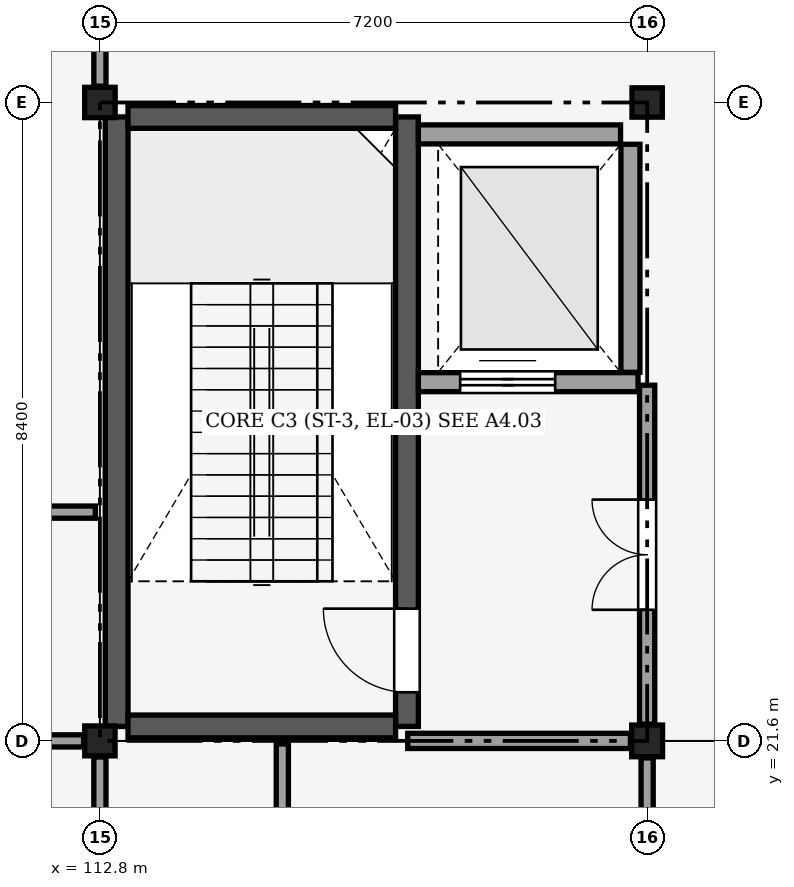
"""IFC4 building model, lengths in metres.
Left out: names, types, materials, properties, quantities, classifications, styles, units other than length and angle.
Written with IfcOpenShell. Run it as: python <this file> out.ifc"""

import sys

from ifc_helpers import new_model, si_unit, direction, frame, frame_2d, origin, origin_2d, place, context, subcontext, project, spatial, rectangle, i_section, extrude, element, fill, save


model = new_model("IFC4")
c1 = context("Model", 3, precision=1e-05, world=origin(), true_north=direction((0.0, 1.0)))
c2 = subcontext(c1, "Body", "Model", "MODEL_VIEW")
j1 = project(units=[si_unit("LENGTHUNIT", "METRE"), si_unit("PLANEANGLEUNIT", "RADIAN")], contexts=[c1])
p1 = place(None, origin())
s1 = spatial("IfcSite", under=j1, at=p1, CompositionType="ELEMENT")
p2 = place(p1, origin())
s2 = spatial("IfcBuilding", under=s1, at=p2, CompositionType="ELEMENT")
p3 = place(p2, origin())
s3 = spatial("IfcBuildingStorey", under=s2, at=p3, CompositionType="ELEMENT", Elevation=0.0)
p4 = place(p3, frame((112.8, 21.6, 0.0), z_axis=(0.0, 0.0, 1.0), x_axis=(1.0, 0.0, 0.0)))
e1 = element("IfcColumn", 1, at=p4, inside=s3, PredefinedType="COLUMN", context=c2, shape_type="SweptSolid", body=[
    extrude(i_section(OverallWidth=0.399, OverallDepth=0.394, WebThickness=0.023, FlangeThickness=0.037, FilletRadius=0.025, at=origin_2d()), origin(), (0.0, 0.0, 1.0), 5.4),
])
p5 = place(p3, frame((112.8, 30.0, 0.0), z_axis=(0.0, 0.0, 1.0), x_axis=(1.0, 0.0, 0.0)))
e2 = element("IfcColumn", 2, at=p5, inside=s3, PredefinedType="COLUMN", context=c2, shape_type="SweptSolid", body=[
    extrude(i_section(OverallWidth=0.401, OverallDepth=0.399, WebThickness=0.025, FlangeThickness=0.04, FilletRadius=0.025, at=origin_2d()), origin(), (0.0, 0.0, 1.0), 5.4),
])
p6 = place(p3, frame((120.0, 21.6, 0.0), z_axis=(0.0, 0.0, 1.0), x_axis=(1.0, 0.0, 0.0)))
e3 = element("IfcColumn", 3, at=p6, inside=s3, PredefinedType="COLUMN", context=c2, shape_type="SweptSolid", body=[
    extrude(i_section(OverallWidth=0.406, OverallDepth=0.417, WebThickness=0.03, FlangeThickness=0.048, FilletRadius=0.025, at=origin_2d()), origin(), (0.0, 0.0, 1.0), 5.4),
])
p7 = place(p3, frame((120.0, 30.0, 0.0), z_axis=(0.0, 0.0, 1.0), x_axis=(1.0, 0.0, 0.0)))
e4 = element("IfcColumn", 4, at=p7, inside=s3, PredefinedType="COLUMN", context=c2, shape_type="SweptSolid", body=[
    extrude(i_section(OverallWidth=0.399, OverallDepth=0.386, WebThickness=0.021, FlangeThickness=0.033, FilletRadius=0.025, at=origin_2d()), origin(), (0.0, 0.0, 1.0), 5.4),
])
p8 = place(p3, frame((113.02, 21.79, 0.0), z_axis=(0.0, 0.0, 1.0), x_axis=(0.0, 1.0, 0.0)))
e5 = element("IfcWall", 5, at=p8, inside=s3, PredefinedType="SHEAR", context=c2, shape_type="SweptSolid", body=[
    extrude(rectangle(XDim=8.02, YDim=0.3, at=frame_2d((4.01, 0.0))), origin(), (0.0, 0.0, 1.0), 5.16),
])
p9 = place(p3, frame((116.84, 21.79, 0.0), z_axis=(0.0, 0.0, 1.0), x_axis=(0.0, 1.0, 0.0)))
e6 = element("IfcWall", 6, at=p9, inside=s3, PredefinedType="SHEAR", context=c2, shape_type="SweptSolid", body=[
    extrude(rectangle(XDim=8.02, YDim=0.3, at=frame_2d((4.01, 0.0))), origin(), (0.0, 0.0, 1.0), 5.16),
])
p10 = place(p9, frame((0.45, 0.0, 0.0)))
e7 = element("IfcOpeningElement", 7, at=p10, cuts=e6, PredefinedType="OPENING", context=c2, shape_type="SweptSolid", body=[
    extrude(rectangle(XDim=1.1, YDim=2.15, at=frame_2d((0.55, 1.075))), frame((0.0, 0.16, 0.0), z_axis=(0.0, -1.0, 0.0), x_axis=(1.0, 0.0, 0.0)), (0.0, 0.0, 1.0), 0.321),
])
for number, where, z_axis, x_axis in (
    (8, (113.17, 21.79, 0.0), (0.0, 0.0, 1.0), (1.0, 0.0, 0.0)),
    (9, (113.17, 29.81, 0.0), (0.0, 0.0, 1.0), (1.0, 0.0, 0.0)),
):
    element("IfcWall", number, at=place(p3, frame(where, z_axis=z_axis, x_axis=x_axis)), inside=s3, PredefinedType="SHEAR", context=c2, shape_type="SweptSolid", body=[
        extrude(rectangle(XDim=3.52, YDim=0.3, at=frame_2d((1.76, 0.0))), origin(), (0.0, 0.0, 1.0), 5.16),
    ])
p11 = place(p3, frame((116.99, 29.58, 0.0), z_axis=(0.0, 0.0, 1.0), x_axis=(1.0, 0.0, 0.0)))
e10 = element("IfcWall", 10, at=p11, inside=s3, PredefinedType="PARTITIONING", context=c2, shape_type="SweptSolid", body=[
    extrude(rectangle(XDim=2.66, YDim=0.25, at=frame_2d((1.33, 0.0))), origin(), (0.0, 0.0, 1.0), 5.16),
])
p12 = place(p3, frame((119.78, 26.45, 0.0), z_axis=(0.0, 0.0, 1.0), x_axis=(0.0, 1.0, 0.0)))
e11 = element("IfcWall", 11, at=p12, inside=s3, PredefinedType="PARTITIONING", context=c2, shape_type="SweptSolid", body=[
    extrude(rectangle(XDim=3.0, YDim=0.25, at=frame_2d((1.5, 0.0))), origin(), (0.0, 0.0, 1.0), 4.368),
])
p13 = place(p3, frame((116.99, 26.32, 0.0), z_axis=(0.0, 0.0, 1.0), x_axis=(1.0, 0.0, 0.0)))
e12 = element("IfcWall", 12, at=p13, inside=s3, PredefinedType="PARTITIONING", context=c2, shape_type="SweptSolid", body=[
    extrude(rectangle(XDim=2.89, YDim=0.25, at=frame_2d((1.445, 0.0))), origin(), (0.0, 0.0, 1.0), 5.16),
])
p14 = place(p13, frame((0.55, 0.0, 0.0)))
e13 = element("IfcOpeningElement", 13, at=p14, cuts=e12, PredefinedType="OPENING", context=c2, shape_type="SweptSolid", body=[
    extrude(rectangle(XDim=1.25, YDim=2.15, at=frame_2d((0.625, 1.075))), frame((0.0, 0.135, 0.0), z_axis=(0.0, -1.0, 0.0), x_axis=(1.0, 0.0, 0.0)), (0.0, 0.0, 1.0), 0.271),
])
p15 = place(p3, frame((116.85, 21.6, 0.0), z_axis=(0.0, 0.0, 1.0), x_axis=(1.0, 0.0, 0.0)))
e14 = element("IfcWall", 14, at=p15, inside=s3, PredefinedType="PARTITIONING", context=c2, shape_type="SweptSolid", body=[
    extrude(rectangle(XDim=2.93, YDim=0.2, at=frame_2d((1.465, 0.0))), origin(), (0.0, 0.0, 1.0), 4.678),
])
p16 = place(p3, frame((120.0, 21.82, 0.0), z_axis=(0.0, 0.0, 1.0), x_axis=(0.0, 1.0, 0.0)))
e15 = element("IfcWall", 15, at=p16, inside=s3, PredefinedType="PARTITIONING", context=c2, shape_type="SweptSolid", body=[
    extrude(rectangle(XDim=4.46, YDim=0.2, at=frame_2d((2.23, 0.0))), origin(), (0.0, 0.0, 1.0), 4.368),
])
p17 = place(p16, frame((1.505, 0.0, 0.0)))
e16 = element("IfcOpeningElement", 16, at=p17, cuts=e15, PredefinedType="OPENING", context=c2, shape_type="SweptSolid", body=[
    extrude(rectangle(XDim=1.45, YDim=2.2, at=frame_2d((0.725, 1.1))), frame((0.0, 0.11, 0.0), z_axis=(0.0, -1.0, 0.0), x_axis=(1.0, 0.0, 0.0)), (0.0, 0.0, 1.0), 0.22),
])
p18 = place(p3, frame((104.517, 21.6, 0.0), z_axis=(0.0, 0.0, 1.0), x_axis=(1.0, 0.0, 0.0)))
e17 = element("IfcWall", 17, at=p18, inside=s3, PredefinedType="PARTITIONING", context=c2, shape_type="SweptSolid", body=[
    extrude(rectangle(XDim=8.069, YDim=0.16, at=frame_2d((4.034, 0.0))), origin(), (0.0, 0.0, 1.0), 4.528),
])
p19 = place(p18, frame((3.234, 0.0, 0.0)))
e18 = element("IfcOpeningElement", 18, at=p19, cuts=e17, PredefinedType="OPENING", context=c2, shape_type="SweptSolid", body=[
    extrude(rectangle(XDim=1.6, YDim=2.35, at=frame_2d((0.8, 1.175))), frame((0.0, 0.09, 0.0), z_axis=(0.0, -1.0, 0.0), x_axis=(1.0, 0.0, 0.0)), (0.0, 0.0, 1.0), 0.18),
])
p20 = place(p3, frame((112.8, 14.603, 0.0), z_axis=(0.0, 0.0, 1.0), x_axis=(0.0, 1.0, 0.0)))
e19 = element("IfcWall", 19, at=p20, inside=s3, PredefinedType="PARTITIONING", context=c2, shape_type="SweptSolid", body=[
    extrude(rectangle(XDim=6.785, YDim=0.16, at=frame_2d((3.393, 0.0))), origin(), (0.0, 0.0, 1.0), 4.607),
])
p21 = place(p3, frame((104.41, 24.61, 0.0), z_axis=(0.0, 0.0, 1.0), x_axis=(1.0, 0.0, 0.0)))
e20 = element("IfcWall", 20, at=p21, inside=s3, PredefinedType="PARTITIONING", context=c2, shape_type="SweptSolid", body=[
    extrude(rectangle(XDim=8.33, YDim=0.16, at=frame_2d((4.165, 0.0))), origin(), (0.0, 0.0, 1.0), 5.14),
])
p22 = place(p21, frame((3.565, 0.0, 0.0)))
e21 = element("IfcOpeningElement", 21, at=p22, cuts=e20, PredefinedType="OPENING", context=c2, shape_type="SweptSolid", body=[
    extrude(rectangle(XDim=1.2, YDim=2.2, at=frame_2d((0.6, 1.1))), frame((0.0, 0.09, 0.0), z_axis=(0.0, -1.0, 0.0), x_axis=(1.0, 0.0, 0.0)), (0.0, 0.0, 1.0), 0.18),
])
p23 = place(p3, frame((112.8, 30.215, 0.0), z_axis=(0.0, 0.0, 1.0), x_axis=(0.0, 1.0, 0.0)))
e22 = element("IfcWall", 22, at=p23, inside=s3, PredefinedType="PARTITIONING", context=c2, shape_type="SweptSolid", body=[
    extrude(rectangle(XDim=7.967, YDim=0.16, at=frame_2d((3.984, 0.0))), origin(), (0.0, 0.0, 1.0), 4.368),
])
p24 = place(p3, frame((115.2, 14.42, 0.0), z_axis=(0.0, 0.0, 1.0), x_axis=(0.0, 1.0, 0.0)))
e23 = element("IfcWall", 23, at=p24, inside=s3, PredefinedType="PARTITIONING", context=c2, shape_type="SweptSolid", body=[
    extrude(rectangle(XDim=7.14, YDim=0.16, at=frame_2d((3.57, 0.0))), origin(), (0.0, 0.0, 1.0), 5.14),
])
p25 = place(p3, frame((120.0, 14.602, 0.0), z_axis=(0.0, 0.0, 1.0), x_axis=(0.0, 1.0, 0.0)))
e24 = element("IfcWall", 24, at=p25, inside=s3, PredefinedType="PARTITIONING", context=c2, shape_type="SweptSolid", body=[
    extrude(rectangle(XDim=6.775, YDim=0.16, at=frame_2d((3.387, 0.0))), origin(), (0.0, 0.0, 1.0), 4.678),
])
p26 = place(p10, origin())
e25 = element("IfcDoor", 25, at=p26, inside=s3, OperationType="SINGLE_SWING_RIGHT", PredefinedType="DOOR", context=c2, shape_type="SweptSolid", body=[
    extrude(rectangle(XDim=1.1, YDim=2.15, at=frame_2d((0.55, 1.075))), frame((0.0, 0.025, 0.0), z_axis=(0.0, -1.0, 0.0), x_axis=(1.0, 0.0, 0.0)), (0.0, 0.0, 1.0), 0.05),
])
fill(e7, e25)
p27 = place(p14, origin())
e26 = element("IfcDoor", 26, at=p27, inside=s3, OperationType="DOUBLE_DOOR_SLIDING", PredefinedType="DOOR", context=c2, shape_type="SweptSolid", body=[
    extrude(rectangle(XDim=1.25, YDim=2.15, at=frame_2d((0.625, 1.075))), frame((0.0, 0.025, 0.0), z_axis=(0.0, -1.0, 0.0), x_axis=(1.0, 0.0, 0.0)), (0.0, 0.0, 1.0), 0.05),
])
fill(e13, e26)
p28 = place(p17, origin())
e27 = element("IfcDoor", 27, at=p28, inside=s3, OperationType="DOUBLE_DOOR_SINGLE_SWING", PredefinedType="DOOR", context=c2, shape_type="SweptSolid", body=[
    extrude(rectangle(XDim=1.45, YDim=2.2, at=frame_2d((0.725, 1.1))), frame((0.0, 0.025, 0.0), z_axis=(0.0, -1.0, 0.0), x_axis=(1.0, 0.0, 0.0)), (0.0, 0.0, 1.0), 0.05),
])
fill(e16, e27)
save(model, sys.argv[1])
